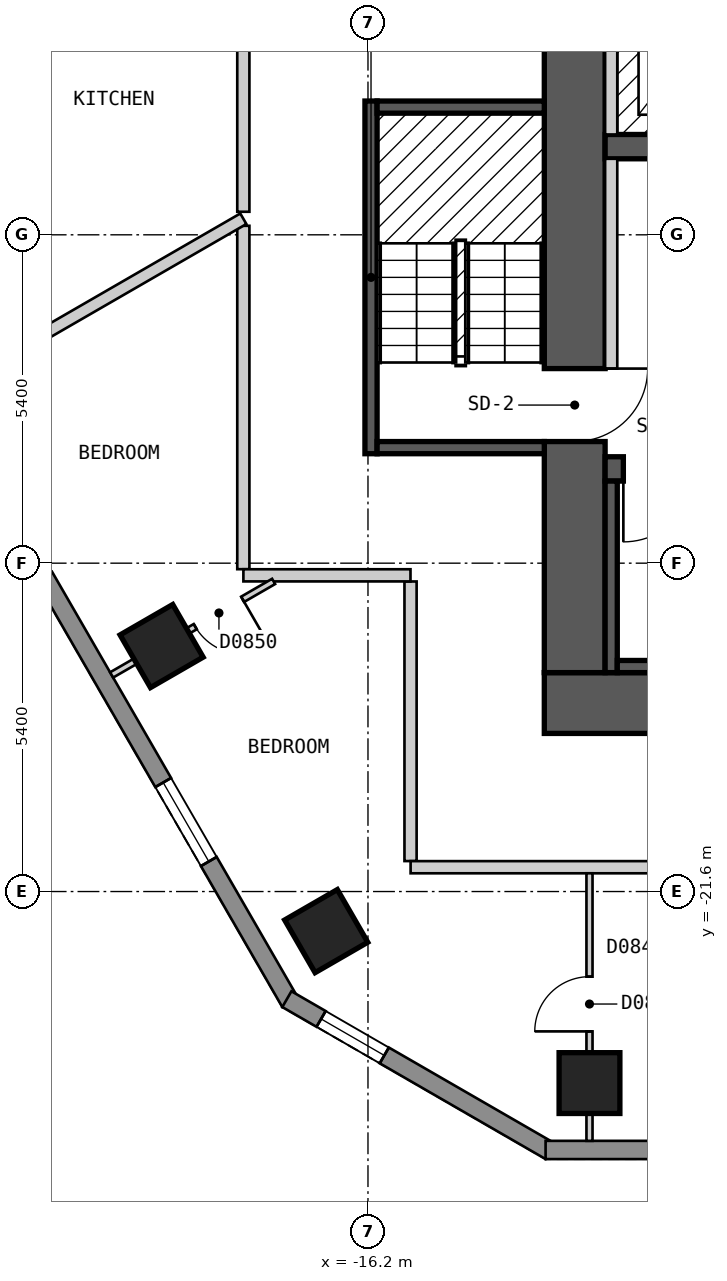
"""IFC4 building model, lengths in metres.
Left out: names, types, materials, properties, quantities, classifications, styles, units other than length and angle.
Written with IfcOpenShell. Run it as: python <this file> out.ifc"""

import sys

from ifc_helpers import new_model, si_unit, direction, frame, frame_2d, origin, origin_2d, place, context, subcontext, project, spatial, polyline, rectangle, outline, extrude, element, fill, save


model = new_model("IFC4")
c1 = context("Model", 3, precision=1e-05, world=origin(), true_north=direction((0.0, 1.0)))
c2 = subcontext(c1, "Body", "Model", "MODEL_VIEW")
j1 = project(units=[si_unit("LENGTHUNIT", "METRE"), si_unit("PLANEANGLEUNIT", "RADIAN")], contexts=[c1])
p1 = place(None, origin())
s1 = spatial("IfcSite", under=j1, at=p1, CompositionType="ELEMENT")
p2 = place(p1, origin())
s2 = spatial("IfcBuilding", under=s1, at=p2, CompositionType="ELEMENT")
p3 = place(p2, frame((0.0, 0.0, 84.0)))
s3 = spatial("IfcBuildingStorey", under=s2, at=p3, CompositionType="ELEMENT", Elevation=84.0)
for number, where, z_axis, x_axis in (
    (1, (-19.594, -17.563, 0.0), (0.0, 0.0, 1.0), (0.5, -0.866, 0.0)),
    (2, (-16.887, -22.251, 0.0), (0.0, 0.0, 1.0), (0.5, -0.866, 0.0)),
    (3, (-12.557, -24.75, 0.0), (0.0, 0.0, 1.0), (1.0, 0.0, 0.0)),
):
    element("IfcColumn", number, at=place(p3, frame(where, z_axis=z_axis, x_axis=x_axis)), inside=s3, PredefinedType="COLUMN", context=c2, shape_type="SweptSolid", body=[
        extrude(rectangle(XDim=1.0, YDim=1.0, at=origin_2d()), origin(), (0.0, 0.0, 1.0), 3.0),
    ])
p4 = place(p3, frame((-13.3, -18.5, 0.0), z_axis=(0.0, 0.0, 1.0), x_axis=(1.0, 0.0, 0.0)))
e4 = element("IfcWall", 4, at=p4, inside=s3, PredefinedType="SHEAR", context=c2, shape_type="SweptSolid", body=[
    extrude(rectangle(XDim=26.6, YDim=1.0, at=frame_2d((13.3, 0.0))), origin(), (0.0, 0.0, 1.0), 2.7),
])
p5 = place(p3, frame((-12.8, -18.0, 0.0), z_axis=(0.0, 0.0, 1.0), x_axis=(0.0, 1.0, 0.0)))
e5 = element("IfcWall", 5, at=p5, inside=s3, PredefinedType="SHEAR", context=c2, shape_type="SweptSolid", body=[
    extrude(rectangle(XDim=12.0, YDim=1.0, at=frame_2d((6.0, 0.0))), origin(), (0.0, 0.0, 1.0), 2.7),
])
p6 = place(p5, frame((3.8, 0.0, 0.0)))
e6 = element("IfcOpeningElement", 6, at=p6, cuts=e5, PredefinedType="OPENING", context=c2, shape_type="SweptSolid", body=[
    extrude(rectangle(XDim=1.2, YDim=2.1, at=frame_2d((0.6, 1.05))), frame((0.0, 0.51, 0.0), z_axis=(0.0, -1.0, 0.0), x_axis=(1.0, 0.0, 0.0)), (0.0, 0.0, 1.0), 1.02),
])
p7 = place(p3, frame((-12.3, -14.65, 0.0), z_axis=(0.0, 0.0, 1.0), x_axis=(1.0, 0.0, 0.0)))
e7 = element("IfcWall", 7, at=p7, inside=s3, PredefinedType="SHEAR", context=c2, shape_type="SweptSolid", body=[
    extrude(rectangle(XDim=24.6, YDim=0.4, at=frame_2d((12.3, 0.0))), origin(), (0.0, 0.0, 1.0), 2.7),
])
p8 = place(p7, frame((1.5, 0.0, 0.0), z_axis=(0.0, 0.0, 1.0), x_axis=(-1.0, 0.0, 0.0)))
e8 = element("IfcOpeningElement", 8, at=p8, cuts=e7, PredefinedType="OPENING", context=c2, shape_type="SweptSolid", body=[
    extrude(rectangle(XDim=1.2, YDim=2.1, at=frame_2d((0.6, 1.05))), frame((0.0, 0.21, 0.0), z_axis=(0.0, -1.0, 0.0), x_axis=(1.0, 0.0, 0.0)), (0.0, 0.0, 1.0), 0.42),
])
p9 = place(p7, frame((24.35, 0.0, 0.0), z_axis=(0.0, 0.0, 1.0), x_axis=(-1.0, 0.0, 0.0)))
e9 = element("IfcOpeningElement", 9, at=p9, cuts=e7, PredefinedType="OPENING", context=c2, shape_type="SweptSolid", body=[
    extrude(rectangle(XDim=1.2, YDim=2.1, at=frame_2d((0.6, 1.05))), frame((0.0, 0.21, 0.0), z_axis=(0.0, -1.0, 0.0), x_axis=(1.0, 0.0, 0.0)), (0.0, 0.0, 1.0), 0.42),
])
p10 = place(p7, frame((16.45, 0.0, 0.0), z_axis=(0.0, 0.0, 1.0), x_axis=(-1.0, 0.0, 0.0)))
e10 = element("IfcOpeningElement", 10, at=p10, cuts=e7, PredefinedType="OPENING", context=c2, shape_type="SweptSolid", body=[
    extrude(rectangle(XDim=0.9, YDim=2.1, at=frame_2d((0.45, 1.05))), frame((0.0, 0.21, 0.0), z_axis=(0.0, -1.0, 0.0), x_axis=(1.0, 0.0, 0.0)), (0.0, 0.0, 1.0), 0.42),
])
p11 = place(p7, frame((18.25, 0.0, 0.0), z_axis=(0.0, 0.0, 1.0), x_axis=(-1.0, 0.0, 0.0)))
e11 = element("IfcOpeningElement", 11, at=p11, cuts=e7, PredefinedType="OPENING", context=c2, shape_type="SweptSolid", body=[
    extrude(rectangle(XDim=0.9, YDim=2.1, at=frame_2d((0.45, 1.05))), frame((0.0, 0.21, 0.0), z_axis=(0.0, -1.0, 0.0), x_axis=(1.0, 0.0, 0.0)), (0.0, 0.0, 1.0), 0.42),
])
p12 = place(p3, frame((-12.3, -9.35, 0.0), z_axis=(0.0, 0.0, 1.0), x_axis=(1.0, 0.0, 0.0)))
e12 = element("IfcWall", 12, at=p12, inside=s3, PredefinedType="SHEAR", context=c2, shape_type="SweptSolid", body=[
    extrude(rectangle(XDim=22.5, YDim=0.4, at=frame_2d((11.25, 0.0))), origin(), (0.0, 0.0, 1.0), 2.7),
])
p13 = place(p12, frame((0.9, 0.0, 0.0)))
e13 = element("IfcOpeningElement", 13, at=p13, cuts=e12, PredefinedType="OPENING", context=c2, shape_type="SweptSolid", body=[
    extrude(rectangle(XDim=1.1, YDim=2.1, at=frame_2d((0.55, 1.05))), frame((0.0, 0.21, 0.0), z_axis=(0.0, -1.0, 0.0), x_axis=(1.0, 0.0, 0.0)), (0.0, 0.0, 1.0), 0.42),
])
p14 = place(p12, frame((3.7, 0.0, 0.0)))
e14 = element("IfcOpeningElement", 14, at=p14, cuts=e12, PredefinedType="OPENING", context=c2, shape_type="SweptSolid", body=[
    extrude(rectangle(XDim=1.1, YDim=2.1, at=frame_2d((0.55, 1.05))), frame((0.0, 0.21, 0.0), z_axis=(0.0, -1.0, 0.0), x_axis=(1.0, 0.0, 0.0)), (0.0, 0.0, 1.0), 0.42),
])
p15 = place(p12, frame((6.5, 0.0, 0.0)))
e15 = element("IfcOpeningElement", 15, at=p15, cuts=e12, PredefinedType="OPENING", context=c2, shape_type="SweptSolid", body=[
    extrude(rectangle(XDim=1.1, YDim=2.1, at=frame_2d((0.55, 1.05))), frame((0.0, 0.21, 0.0), z_axis=(0.0, -1.0, 0.0), x_axis=(1.0, 0.0, 0.0)), (0.0, 0.0, 1.0), 0.42),
])
p16 = place(p12, frame((8.8, 0.0, 0.0)))
e16 = element("IfcOpeningElement", 16, at=p16, cuts=e12, PredefinedType="OPENING", context=c2, shape_type="SweptSolid", body=[
    extrude(rectangle(XDim=1.1, YDim=2.1, at=frame_2d((0.55, 1.05))), frame((0.0, 0.21, 0.0), z_axis=(0.0, -1.0, 0.0), x_axis=(1.0, 0.0, 0.0)), (0.0, 0.0, 1.0), 0.42),
])
p17 = place(p12, frame((11.1, 0.0, 0.0)))
e17 = element("IfcOpeningElement", 17, at=p17, cuts=e12, PredefinedType="OPENING", context=c2, shape_type="SweptSolid", body=[
    extrude(rectangle(XDim=1.1, YDim=2.1, at=frame_2d((0.55, 1.05))), frame((0.0, 0.21, 0.0), z_axis=(0.0, -1.0, 0.0), x_axis=(1.0, 0.0, 0.0)), (0.0, 0.0, 1.0), 0.42),
])
p18 = place(p12, frame((13.4, 0.0, 0.0)))
e18 = element("IfcOpeningElement", 18, at=p18, cuts=e12, PredefinedType="OPENING", context=c2, shape_type="SweptSolid", body=[
    extrude(rectangle(XDim=1.1, YDim=2.1, at=frame_2d((0.55, 1.05))), frame((0.0, 0.21, 0.0), z_axis=(0.0, -1.0, 0.0), x_axis=(1.0, 0.0, 0.0)), (0.0, 0.0, 1.0), 0.42),
])
p19 = place(p12, frame((15.7, 0.0, 0.0)))
e19 = element("IfcOpeningElement", 19, at=p19, cuts=e12, PredefinedType="OPENING", context=c2, shape_type="SweptSolid", body=[
    extrude(rectangle(XDim=1.1, YDim=2.1, at=frame_2d((0.55, 1.05))), frame((0.0, 0.21, 0.0), z_axis=(0.0, -1.0, 0.0), x_axis=(1.0, 0.0, 0.0)), (0.0, 0.0, 1.0), 0.42),
])
p20 = place(p12, frame((18.0, 0.0, 0.0)))
e20 = element("IfcOpeningElement", 20, at=p20, cuts=e12, PredefinedType="OPENING", context=c2, shape_type="SweptSolid", body=[
    extrude(rectangle(XDim=1.1, YDim=2.1, at=frame_2d((0.55, 1.05))), frame((0.0, 0.21, 0.0), z_axis=(0.0, -1.0, 0.0), x_axis=(1.0, 0.0, 0.0)), (0.0, 0.0, 1.0), 0.42),
])
p21 = place(p12, frame((20.4, 0.0, 0.0)))
e21 = element("IfcOpeningElement", 21, at=p21, cuts=e12, PredefinedType="OPENING", context=c2, shape_type="SweptSolid", body=[
    extrude(rectangle(XDim=1.1, YDim=2.1, at=frame_2d((0.55, 1.05))), frame((0.0, 0.21, 0.0), z_axis=(0.0, -1.0, 0.0), x_axis=(1.0, 0.0, 0.0)), (0.0, 0.0, 1.0), 0.42),
])
p22 = place(p3, frame((-29.027, -3.425, 0.0), z_axis=(0.0, 0.0, 1.0), x_axis=(0.500035407905, -0.866004960056, 0.0)))
e22 = element("IfcWall", 22, at=p22, inside=s3, PredefinedType="SOLIDWALL", context=c2, shape_type="SweptSolid", body=[
    extrude(outline(polyline([(0.0, -0.15), (23.094, -0.15), (23.014, 0.15), (0.08, 0.15), (0.0, -0.15)])), origin(), (0.0, 0.0, 1.0), 2.7),
])
p23 = place(p22, frame((2.677, 0.0, 0.15)))
e23 = element("IfcOpeningElement", 23, at=p23, cuts=e22, PredefinedType="OPENING", context=c2, shape_type="SweptSolid", body=[
    extrude(rectangle(XDim=1.5, YDim=2.1, at=frame_2d((0.75, 1.05))), frame((0.0, 0.16, 0.0), z_axis=(0.0, -1.0, 0.0), x_axis=(1.0, 0.0, 0.0)), (0.0, 0.0, 1.0), 0.32),
])
p24 = place(p22, frame((8.091, 0.0, 0.15)))
e24 = element("IfcOpeningElement", 24, at=p24, cuts=e22, PredefinedType="OPENING", context=c2, shape_type="SweptSolid", body=[
    extrude(rectangle(XDim=1.5, YDim=2.1, at=frame_2d((0.75, 1.05))), frame((0.0, 0.16, 0.0), z_axis=(0.0, -1.0, 0.0), x_axis=(1.0, 0.0, 0.0)), (0.0, 0.0, 1.0), 0.32),
])
p25 = place(p22, frame((13.504, 0.0, 0.15)))
e25 = element("IfcOpeningElement", 25, at=p25, cuts=e22, PredefinedType="OPENING", context=c2, shape_type="SweptSolid", body=[
    extrude(rectangle(XDim=1.5, YDim=2.1, at=frame_2d((0.75, 1.05))), frame((0.0, 0.16, 0.0), z_axis=(0.0, -1.0, 0.0), x_axis=(1.0, 0.0, 0.0)), (0.0, 0.0, 1.0), 0.32),
])
p26 = place(p22, frame((18.917, 0.0, 0.15)))
e26 = element("IfcOpeningElement", 26, at=p26, cuts=e22, PredefinedType="OPENING", context=c2, shape_type="SweptSolid", body=[
    extrude(rectangle(XDim=1.5, YDim=2.1, at=frame_2d((0.75, 1.05))), frame((0.0, 0.16, 0.0), z_axis=(0.0, -1.0, 0.0), x_axis=(1.0, 0.0, 0.0)), (0.0, 0.0, 1.0), 0.32),
])
p27 = place(p3, frame((-17.534, -23.37, 0.0), z_axis=(0.0, 0.0, 1.0), x_axis=(0.866010750942, -0.50002537861, 0.0)))
e27 = element("IfcWall", 27, at=p27, inside=s3, PredefinedType="SOLIDWALL", context=c2, shape_type="SweptSolid", body=[
    extrude(outline(polyline([(0.0, -0.15), (5.0, -0.15), (4.919, 0.15), (0.08, 0.15), (0.0, -0.15)])), origin(), (0.0, 0.0, 1.0), 2.7),
])
p28 = place(p27, frame((0.65, 0.0, 0.15)))
e28 = element("IfcOpeningElement", 28, at=p28, cuts=e27, PredefinedType="OPENING", context=c2, shape_type="SweptSolid", body=[
    extrude(rectangle(XDim=1.2, YDim=2.1, at=frame_2d((0.6, 1.05))), frame((0.0, 0.16, 0.0), z_axis=(0.0, -1.0, 0.0), x_axis=(1.0, 0.0, 0.0)), (0.0, 0.0, 1.0), 0.32),
])
p29 = place(p3, frame((-13.279, -25.85, 0.0), z_axis=(0.0, 0.0, 1.0), x_axis=(1.0, 0.0, 0.0)))
e29 = element("IfcWall", 29, at=p29, inside=s3, PredefinedType="SOLIDWALL", context=c2, shape_type="SweptSolid", body=[
    extrude(outline(polyline([(0.0, -0.15), (26.558, -0.15), (26.478, 0.15), (0.08, 0.15), (0.0, -0.15)])), origin(), (0.0, 0.0, 1.0), 2.7),
])
p30 = place(p29, frame((2.483, 0.0, 0.15)))
e30 = element("IfcOpeningElement", 30, at=p30, cuts=e29, PredefinedType="OPENING", context=c2, shape_type="SweptSolid", body=[
    extrude(rectangle(XDim=1.5, YDim=2.1, at=frame_2d((0.75, 1.05))), frame((0.0, 0.16, 0.0), z_axis=(0.0, -1.0, 0.0), x_axis=(1.0, 0.0, 0.0)), (0.0, 0.0, 1.0), 0.32),
])
p31 = place(p29, frame((7.507, 0.0, 0.15)))
e31 = element("IfcOpeningElement", 31, at=p31, cuts=e29, PredefinedType="OPENING", context=c2, shape_type="SweptSolid", body=[
    extrude(rectangle(XDim=1.5, YDim=2.1, at=frame_2d((0.75, 1.05))), frame((0.0, 0.16, 0.0), z_axis=(0.0, -1.0, 0.0), x_axis=(1.0, 0.0, 0.0)), (0.0, 0.0, 1.0), 0.32),
])
p32 = place(p29, frame((12.529, 0.0, 0.15)))
e32 = element("IfcOpeningElement", 32, at=p32, cuts=e29, PredefinedType="OPENING", context=c2, shape_type="SweptSolid", body=[
    extrude(rectangle(XDim=1.5, YDim=2.1, at=frame_2d((0.75, 1.05))), frame((0.0, 0.16, 0.0), z_axis=(0.0, -1.0, 0.0), x_axis=(1.0, 0.0, 0.0)), (0.0, 0.0, 1.0), 0.32),
])
p33 = place(p29, frame((17.553, 0.0, 0.15)))
e33 = element("IfcOpeningElement", 33, at=p33, cuts=e29, PredefinedType="OPENING", context=c2, shape_type="SweptSolid", body=[
    extrude(rectangle(XDim=1.5, YDim=2.1, at=frame_2d((0.75, 1.05))), frame((0.0, 0.16, 0.0), z_axis=(0.0, -1.0, 0.0), x_axis=(1.0, 0.0, 0.0)), (0.0, 0.0, 1.0), 0.32),
])
p34 = place(p29, frame((22.575, 0.0, 0.15)))
e34 = element("IfcOpeningElement", 34, at=p34, cuts=e29, PredefinedType="OPENING", context=c2, shape_type="SweptSolid", body=[
    extrude(rectangle(XDim=1.5, YDim=2.1, at=frame_2d((0.75, 1.05))), frame((0.0, 0.16, 0.0), z_axis=(0.0, -1.0, 0.0), x_axis=(1.0, 0.0, 0.0)), (0.0, 0.0, 1.0), 0.32),
])
p35 = place(p3, frame((-15.5, -16.501, 0.0), z_axis=(0.0, 0.0, 1.0), x_axis=(0.0, -1.0, 0.0)))
e35 = element("IfcWall", 35, at=p35, inside=s3, PredefinedType="PARTITIONING", context=c2, shape_type="SweptSolid", body=[
    extrude(rectangle(XDim=4.598, YDim=0.2, at=frame_2d((2.299, 0.0))), origin(), (0.0, 0.0, 1.0), 2.7),
])
p36 = place(p3, frame((-18.25, -10.652, 0.0), z_axis=(0.0, 0.0, 1.0), x_axis=(0.0, -1.0, 0.0)))
e36 = element("IfcWall", 36, at=p36, inside=s3, PredefinedType="PARTITIONING", context=c2, shape_type="SweptSolid", body=[
    extrude(rectangle(XDim=5.647, YDim=0.2, at=frame_2d((2.823, 0.0))), origin(), (0.0, 0.0, 1.0), 2.7),
])
p37 = place(p3, frame((-18.249, -16.4, 0.0), z_axis=(0.0, 0.0, 1.0), x_axis=(1.0, 0.0, 0.0)))
e37 = element("IfcWall", 37, at=p37, inside=s3, PredefinedType="PARTITIONING", context=c2, shape_type="SweptSolid", body=[
    extrude(rectangle(XDim=2.748, YDim=0.2, at=frame_2d((1.374, 0.0))), origin(), (0.0, 0.0, 1.0), 2.7),
])
p38 = place(p3, frame((-15.499, -21.2, 0.0), z_axis=(0.0, 0.0, 1.0), x_axis=(1.0, 0.0, 0.0)))
e38 = element("IfcWall", 38, at=p38, inside=s3, PredefinedType="PARTITIONING", context=c2, shape_type="SweptSolid", body=[
    extrude(rectangle(XDim=30.898, YDim=0.2, at=frame_2d((15.449, 0.0))), origin(), (0.0, 0.0, 1.0), 2.7),
])
p39 = place(p38, frame((4.954, 0.0, 0.0)))
e39 = element("IfcOpeningElement", 39, at=p39, cuts=e38, PredefinedType="OPENING", context=c2, shape_type="SweptSolid", body=[
    extrude(rectangle(XDim=1.0, YDim=2.1, at=frame_2d((0.5, 1.05))), frame((0.0, 0.11, 0.0), z_axis=(0.0, -1.0, 0.0), x_axis=(1.0, 0.0, 0.0)), (0.0, 0.0, 1.0), 0.22),
])
p40 = place(p38, frame((20.023, 0.0, 0.0)))
e40 = element("IfcOpeningElement", 40, at=p40, cuts=e38, PredefinedType="OPENING", context=c2, shape_type="SweptSolid", body=[
    extrude(rectangle(XDim=1.0, YDim=2.1, at=frame_2d((0.5, 1.05))), frame((0.0, 0.11, 0.0), z_axis=(0.0, -1.0, 0.0), x_axis=(1.0, 0.0, 0.0)), (0.0, 0.0, 1.0), 0.22),
])
p41 = place(p38, frame((25.046, 0.0, 0.0)))
e41 = element("IfcOpeningElement", 41, at=p41, cuts=e38, PredefinedType="OPENING", context=c2, shape_type="SweptSolid", body=[
    extrude(rectangle(XDim=1.0, YDim=2.1, at=frame_2d((0.5, 1.05))), frame((0.0, 0.11, 0.0), z_axis=(0.0, -1.0, 0.0), x_axis=(1.0, 0.0, 0.0)), (0.0, 0.0, 1.0), 0.22),
])
p42 = place(p3, frame((-18.25, -10.421, 0.0), z_axis=(0.0, 0.0, 1.0), x_axis=(0.0, 1.0, 0.0)))
e42 = element("IfcWall", 42, at=p42, inside=s3, PredefinedType="PARTITIONING", context=c2, shape_type="SweptSolid", body=[
    extrude(rectangle(XDim=3.821, YDim=0.2, at=frame_2d((1.91, 0.0))), origin(), (0.0, 0.0, 1.0), 2.7),
])
p43 = place(p3, frame((-12.557, -25.7, 0.0), z_axis=(0.0, 0.0, 1.0), x_axis=(0.0, 1.0, 0.0)))
e43 = element("IfcWall", 43, at=p43, inside=s3, PredefinedType="PARTITIONING", context=c2, shape_type="SweptSolid", body=[
    extrude(rectangle(XDim=4.4, YDim=0.1, at=frame_2d((2.2, 0.0))), origin(), (0.0, 0.0, 1.0), 2.7),
])
p44 = place(p43, frame((1.8, 0.0, 0.0)))
e44 = element("IfcOpeningElement", 44, at=p44, cuts=e43, PredefinedType="OPENING", context=c2, shape_type="SweptSolid", body=[
    extrude(rectangle(XDim=0.9, YDim=2.1, at=frame_2d((0.45, 1.05))), frame((0.0, 0.06, 0.0), z_axis=(0.0, -1.0, 0.0), x_axis=(1.0, 0.0, 0.0)), (0.0, 0.0, 1.0), 0.12),
])
p45 = place(p3, frame((-20.416, -18.038, 0.0), z_axis=(0.0, 0.0, 1.0), x_axis=(0.866026989333, 0.499997253739, 0.0)))
e45 = element("IfcWall", 45, at=p45, inside=s3, PredefinedType="PARTITIONING", context=c2, shape_type="SweptSolid", body=[
    extrude(rectangle(XDim=3.076, YDim=0.1, at=frame_2d((1.538, 0.0))), origin(), (0.0, 0.0, 1.0), 2.7),
])
p46 = place(p45, frame((1.588, 0.0, 0.0)))
e46 = element("IfcOpeningElement", 46, at=p46, cuts=e45, PredefinedType="OPENING", context=c2, shape_type="SweptSolid", body=[
    extrude(rectangle(XDim=0.9, YDim=2.1, at=frame_2d((0.45, 1.05))), frame((0.0, 0.06, 0.0), z_axis=(0.0, -1.0, 0.0), x_axis=(1.0, 0.0, 0.0)), (0.0, 0.0, 1.0), 0.12),
])
p47 = place(p3, frame((-25.83, -8.662, 0.0), z_axis=(0.0, 0.0, 1.0), x_axis=(0.866022959057, 0.500004234368, 0.0)))
e47 = element("IfcWall", 47, at=p47, inside=s3, PredefinedType="PARTITIONING", context=c2, shape_type="SweptSolid", body=[
    extrude(rectangle(XDim=10.0, YDim=0.1, at=frame_2d((5.0, 0.0))), origin(), (0.0, 0.0, 1.0), 2.7),
])
p48 = place(p47, frame((6.551, 0.0, 0.0)))
e48 = element("IfcOpeningElement", 48, at=p48, cuts=e47, PredefinedType="OPENING", context=c2, shape_type="SweptSolid", body=[
    extrude(rectangle(XDim=0.9, YDim=2.1, at=frame_2d((0.45, 1.05))), frame((0.0, 0.06, 0.0), z_axis=(0.0, -1.0, 0.0), x_axis=(1.0, 0.0, 0.0)), (0.0, 0.0, 1.0), 0.12),
])
p49 = place(p47, frame((1.501, 0.0, 0.0)))
e49 = element("IfcOpeningElement", 49, at=p49, cuts=e47, PredefinedType="OPENING", context=c2, shape_type="SweptSolid", body=[
    extrude(rectangle(XDim=0.9, YDim=2.1, at=frame_2d((0.45, 1.05))), frame((0.0, 0.06, 0.0), z_axis=(0.0, -1.0, 0.0), x_axis=(1.0, 0.0, 0.0)), (0.0, 0.0, 1.0), 0.12),
])
p50 = place(p3, frame((-23.123, -13.35, 0.0), z_axis=(0.0, 0.0, 1.0), x_axis=(0.86596737403, 0.500100497016, 0.0)))
e50 = element("IfcWall", 50, at=p50, inside=s3, PredefinedType="PARTITIONING", context=c2, shape_type="SweptSolid", body=[
    extrude(rectangle(XDim=5.627, YDim=0.2, at=frame_2d((2.813, 0.0))), origin(), (0.0, 0.0, 1.0), 2.7),
])
p51 = place(p3, frame((-16.15, -14.4, 0.0), z_axis=(0.0, 0.0, 1.0), x_axis=(0.0, 1.0, 0.0)))
e51 = element("IfcWall", 51, at=p51, inside=s3, PredefinedType="SOLIDWALL", context=c2, shape_type="SweptSolid", body=[
    extrude(rectangle(XDim=5.8, YDim=0.2, at=frame_2d((2.9, 0.0))), origin(), (0.0, 0.0, 1.0), 2.7),
])
for number, where, z_axis, x_axis in (
    (52, (-16.05, -14.3, 0.0), (0.0, 0.0, 1.0), (1.0, 0.0, 0.0)),
    (53, (-16.05, -8.7, 0.0), (0.0, 0.0, 1.0), (1.0, 0.0, 0.0)),
):
    element("IfcWall", number, at=place(p3, frame(where, z_axis=z_axis, x_axis=x_axis)), inside=s3, PredefinedType="SOLIDWALL", context=c2, shape_type="SweptSolid", body=[
        extrude(rectangle(XDim=2.75, YDim=0.2, at=frame_2d((1.375, 0.0))), origin(), (0.0, 0.0, 1.0), 2.7),
    ])
p52 = place(p3, frame((-12.2, -18.0, 0.0), z_axis=(0.0, 0.0, 1.0), x_axis=(0.0, 1.0, 0.0)))
e54 = element("IfcWall", 54, at=p52, inside=s3, PredefinedType="SOLIDWALL", context=c2, shape_type="SweptSolid", body=[
    extrude(rectangle(XDim=3.15, YDim=0.2, at=frame_2d((1.575, 0.0))), origin(), (0.0, 0.0, 1.0), 2.7),
])
p53 = place(p3, frame((-12.2, -13.0, 0.0), z_axis=(0.0, 0.0, 1.0), x_axis=(0.0, 1.0, 0.0)))
e55 = element("IfcWall", 55, at=p53, inside=s3, PredefinedType="PARTITIONING", context=c2, shape_type="SweptSolid", body=[
    extrude(rectangle(XDim=3.45, YDim=0.2, at=frame_2d((1.725, 0.0))), origin(), (0.0, 0.0, 1.0), 2.7),
])
p54 = place(p3, frame((-12.2, -9.15, 0.0), z_axis=(0.0, 0.0, 1.0), x_axis=(0.0, 1.0, 0.0)))
e56 = element("IfcWall", 56, at=p54, inside=s3, PredefinedType="SOLIDWALL", context=c2, shape_type="SweptSolid", body=[
    extrude(rectangle(XDim=3.15, YDim=0.2, at=frame_2d((1.575, 0.0))), origin(), (0.0, 0.0, 1.0), 2.7),
])
p55 = place(p3, frame((-12.1, -17.9, 0.0), z_axis=(0.0, 0.0, 1.0), x_axis=(1.0, 0.0, 0.0)))
e57 = element("IfcWall", 57, at=p55, inside=s3, PredefinedType="SOLIDWALL", context=c2, shape_type="SweptSolid", body=[
    extrude(rectangle(XDim=5.4, YDim=0.2, at=frame_2d((2.7, 0.0))), origin(), (0.0, 0.0, 1.0), 2.7),
])
p56 = place(p26, origin())
e58 = element("IfcWindow", 58, at=p56, inside=s3, PartitioningType="SINGLE_PANEL", PredefinedType="WINDOW", context=c2, shape_type="SweptSolid", body=[
    extrude(rectangle(XDim=1.5, YDim=2.1, at=frame_2d((0.75, 1.05))), frame((0.0, 0.03, 0.0), z_axis=(0.0, -1.0, 0.0), x_axis=(1.0, 0.0, 0.0)), (0.0, 0.0, 1.0), 0.06),
])
fill(e26, e58)
p57 = place(p28, origin())
e59 = element("IfcWindow", 59, at=p57, inside=s3, PartitioningType="SINGLE_PANEL", PredefinedType="WINDOW", context=c2, shape_type="SweptSolid", body=[
    extrude(rectangle(XDim=1.2, YDim=2.1, at=frame_2d((0.6, 1.05))), frame((0.0, 0.03, 0.0), z_axis=(0.0, -1.0, 0.0), x_axis=(1.0, 0.0, 0.0)), (0.0, 0.0, 1.0), 0.06),
])
fill(e28, e59)
p58 = place(p44, origin())
e60 = element("IfcDoor", 60, at=p58, inside=s3, OperationType="SINGLE_SWING_LEFT", PredefinedType="DOOR", context=c2, shape_type="SweptSolid", body=[
    extrude(rectangle(XDim=0.9, YDim=2.1, at=frame_2d((0.45, 1.05))), frame((0.0, 0.025, 0.0), z_axis=(0.0, -1.0, 0.0), x_axis=(1.0, 0.0, 0.0)), (0.0, 0.0, 1.0), 0.05),
])
fill(e44, e60)
p59 = place(p46, origin())
e61 = element("IfcDoor", 61, at=p59, inside=s3, OperationType="SINGLE_SWING_RIGHT", PredefinedType="DOOR", context=c2, shape_type="SweptSolid", body=[
    extrude(rectangle(XDim=0.9, YDim=2.1, at=frame_2d((0.45, 1.05))), frame((0.0, 0.025, 0.0), z_axis=(0.0, -1.0, 0.0), x_axis=(1.0, 0.0, 0.0)), (0.0, 0.0, 1.0), 0.05),
])
fill(e46, e61)
p60 = place(p8, origin())
e62 = element("IfcDoor", 62, at=p60, inside=s3, OperationType="SINGLE_SWING_RIGHT", PredefinedType="DOOR", context=c2, shape_type="SweptSolid", body=[
    extrude(rectangle(XDim=1.2, YDim=2.1, at=frame_2d((0.6, 1.05))), frame((0.0, 0.025, 0.0), z_axis=(0.0, -1.0, 0.0), x_axis=(1.0, 0.0, 0.0)), (0.0, 0.0, 1.0), 0.05),
])
fill(e8, e62)
p61 = place(p6, origin())
e63 = element("IfcDoor", 63, at=p61, inside=s3, OperationType="SINGLE_SWING_RIGHT", PredefinedType="DOOR", context=c2, shape_type="SweptSolid", body=[
    extrude(rectangle(XDim=1.2, YDim=2.1, at=frame_2d((0.6, 1.05))), frame((0.0, 0.025, 0.0), z_axis=(0.0, -1.0, 0.0), x_axis=(1.0, 0.0, 0.0)), (0.0, 0.0, 1.0), 0.05),
])
fill(e6, e63)
save(model, sys.argv[1])
